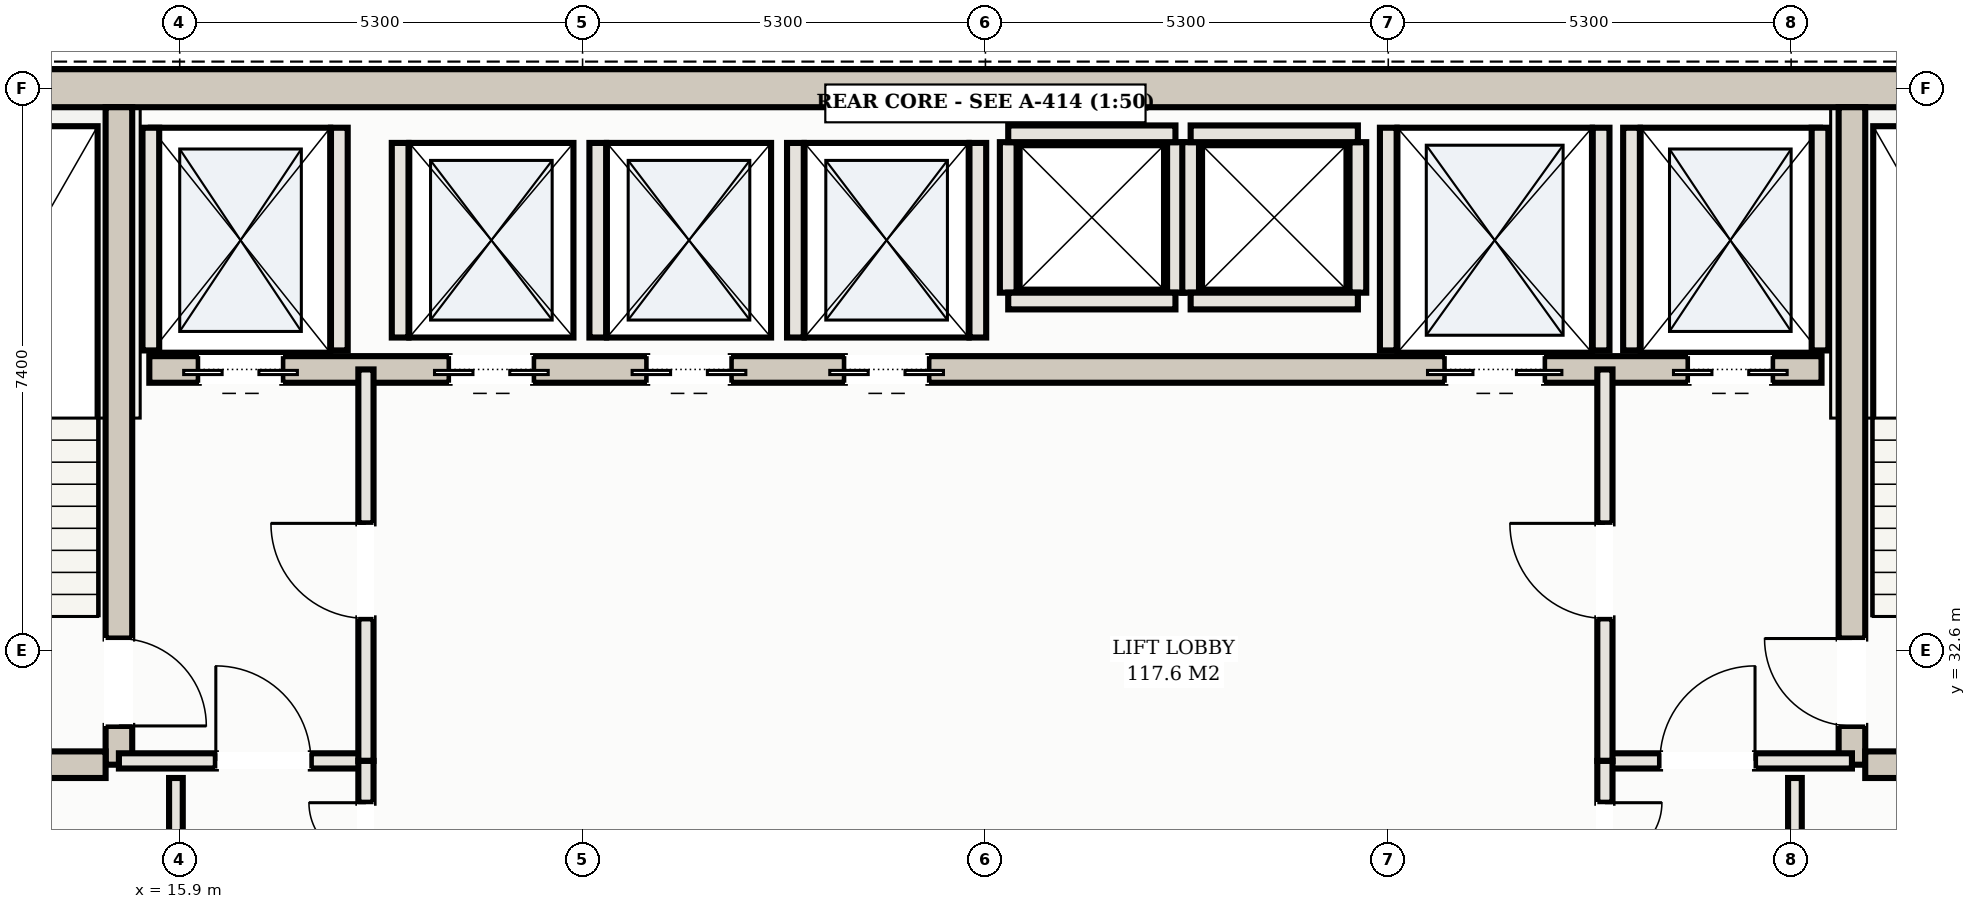
"""IFC4 building model, lengths in metres.
Left out: names, types, materials, properties, quantities, classifications, styles, units other than length and angle.
Written with IfcOpenShell. Run it as: python <this file> out.ifc"""

import sys

from ifc_helpers import new_model, si_unit, direction, frame, frame_2d, origin, place, context, subcontext, project, spatial, rectangle, extrude, element, fill, save


model = new_model("IFC4")
c1 = context("Model", 3, precision=1e-05, world=origin(), true_north=direction((0.0, 1.0)))
c2 = subcontext(c1, "Body", "Model", "MODEL_VIEW")
j1 = project(units=[si_unit("LENGTHUNIT", "METRE"), si_unit("PLANEANGLEUNIT", "RADIAN")], contexts=[c1])
p1 = place(None, origin())
s1 = spatial("IfcSite", under=j1, at=p1, CompositionType="ELEMENT")
p2 = place(p1, origin())
s2 = spatial("IfcBuilding", under=s1, at=p2, CompositionType="ELEMENT")
p3 = place(p2, frame((0.0, 0.0, 246.2)))
s3 = spatial("IfcBuildingStorey", under=s2, at=p3, CompositionType="ELEMENT", Elevation=246.2)
p4 = place(p3, frame((10.35, 40.0, 0.0), z_axis=(0.0, 0.0, 1.0), x_axis=(1.0, 0.0, 0.0)))
e1 = element("IfcWall", 1, at=p4, inside=s3, PredefinedType="SHEAR", context=c2, shape_type="SweptSolid", body=[
    extrude(rectangle(XDim=32.3, YDim=0.5, at=frame_2d((16.15, 0.0))), origin(), (0.0, 0.0, 1.0), 3.11),
])
p5 = place(p3, frame((15.1, 31.1, 0.0), z_axis=(0.0, 0.0, 1.0), x_axis=(0.0, 1.0, 0.0)))
e2 = element("IfcWall", 2, at=p5, inside=s3, PredefinedType="SHEAR", context=c2, shape_type="SweptSolid", body=[
    extrude(rectangle(XDim=8.65, YDim=0.35, at=frame_2d((4.325, 0.0))), origin(), (0.0, 0.0, 1.0), 3.11),
])
p6 = place(p5, frame((0.51, 0.0, 0.0)))
e3 = element("IfcOpeningElement", 3, at=p6, cuts=e2, PredefinedType="OPENING", context=c2, shape_type="SweptSolid", body=[
    extrude(rectangle(XDim=1.15, YDim=2.2, at=frame_2d((0.575, 1.1))), frame((0.0, 0.185, 0.0), z_axis=(0.0, -1.0, 0.0), x_axis=(1.0, 0.0, 0.0)), (0.0, 0.0, 1.0), 0.37),
])
p7 = place(p3, frame((10.85, 31.1, 0.0), z_axis=(0.0, 0.0, 1.0), x_axis=(1.0, 0.0, 0.0)))
e4 = element("IfcWall", 4, at=p7, inside=s3, PredefinedType="SHEAR", context=c2, shape_type="SweptSolid", body=[
    extrude(rectangle(XDim=4.075, YDim=0.35, at=frame_2d((2.038, 0.0))), origin(), (0.0, 0.0, 1.0), 3.11),
])
p8 = place(p3, frame((37.9, 31.1, 0.0), z_axis=(0.0, 0.0, 1.0), x_axis=(0.0, 1.0, 0.0)))
e5 = element("IfcWall", 5, at=p8, inside=s3, PredefinedType="SHEAR", context=c2, shape_type="SweptSolid", body=[
    extrude(rectangle(XDim=8.65, YDim=0.35, at=frame_2d((4.325, 0.0))), origin(), (0.0, 0.0, 1.0), 3.11),
])
p9 = place(p8, frame((0.51, 0.0, 0.0)))
e6 = element("IfcOpeningElement", 6, at=p9, cuts=e5, PredefinedType="OPENING", context=c2, shape_type="SweptSolid", body=[
    extrude(rectangle(XDim=1.15, YDim=2.2, at=frame_2d((0.575, 1.1))), frame((0.0, 0.185, 0.0), z_axis=(0.0, -1.0, 0.0), x_axis=(1.0, 0.0, 0.0)), (0.0, 0.0, 1.0), 0.37),
])
p10 = place(p3, frame((38.075, 31.1, 0.0), z_axis=(0.0, 0.0, 1.0), x_axis=(1.0, 0.0, 0.0)))
e7 = element("IfcWall", 7, at=p10, inside=s3, PredefinedType="SHEAR", context=c2, shape_type="SweptSolid", body=[
    extrude(rectangle(XDim=4.075, YDim=0.35, at=frame_2d((2.038, 0.0))), origin(), (0.0, 0.0, 1.0), 3.11),
])
p11 = place(p3, frame((15.5, 36.3, 0.0), z_axis=(0.0, 0.0, 1.0), x_axis=(1.0, 0.0, 0.0)))
e8 = element("IfcWall", 8, at=p11, inside=s3, PredefinedType="SHEAR", context=c2, shape_type="SweptSolid", body=[
    extrude(rectangle(XDim=22.0, YDim=0.35, at=frame_2d((11.0, 0.0))), origin(), (0.0, 0.0, 1.0), 3.11),
])
p12 = place(p11, frame((0.65, 0.0, 0.0)))
e9 = element("IfcOpeningElement", 9, at=p12, cuts=e8, PredefinedType="OPENING", context=c2, shape_type="SweptSolid", body=[
    extrude(rectangle(XDim=1.1, YDim=2.15, at=frame_2d((0.55, 1.075))), frame((0.0, 0.185, 0.0), z_axis=(0.0, -1.0, 0.0), x_axis=(1.0, 0.0, 0.0)), (0.0, 0.0, 1.0), 0.37),
])
p13 = place(p11, frame((20.25, 0.0, 0.0)))
e10 = element("IfcOpeningElement", 10, at=p13, cuts=e8, PredefinedType="OPENING", context=c2, shape_type="SweptSolid", body=[
    extrude(rectangle(XDim=1.1, YDim=2.15, at=frame_2d((0.55, 1.075))), frame((0.0, 0.185, 0.0), z_axis=(0.0, -1.0, 0.0), x_axis=(1.0, 0.0, 0.0)), (0.0, 0.0, 1.0), 0.37),
])
p14 = place(p11, frame((17.05, 0.0, 0.0)))
e11 = element("IfcOpeningElement", 11, at=p14, cuts=e8, PredefinedType="OPENING", context=c2, shape_type="SweptSolid", body=[
    extrude(rectangle(XDim=1.3, YDim=2.2, at=frame_2d((0.65, 1.1))), frame((0.0, 0.185, 0.0), z_axis=(0.0, -1.0, 0.0), x_axis=(1.0, 0.0, 0.0)), (0.0, 0.0, 1.0), 0.37),
])
p15 = place(p11, frame((3.95, 0.0, 0.0)))
e12 = element("IfcOpeningElement", 12, at=p15, cuts=e8, PredefinedType="OPENING", context=c2, shape_type="SweptSolid", body=[
    extrude(rectangle(XDim=1.1, YDim=2.15, at=frame_2d((0.55, 1.075))), frame((0.0, 0.185, 0.0), z_axis=(0.0, -1.0, 0.0), x_axis=(1.0, 0.0, 0.0)), (0.0, 0.0, 1.0), 0.37),
])
p16 = place(p11, frame((6.55, 0.0, 0.0)))
e13 = element("IfcOpeningElement", 13, at=p16, cuts=e8, PredefinedType="OPENING", context=c2, shape_type="SweptSolid", body=[
    extrude(rectangle(XDim=1.1, YDim=2.15, at=frame_2d((0.55, 1.075))), frame((0.0, 0.185, 0.0), z_axis=(0.0, -1.0, 0.0), x_axis=(1.0, 0.0, 0.0)), (0.0, 0.0, 1.0), 0.37),
])
p17 = place(p11, frame((9.15, 0.0, 0.0)))
e14 = element("IfcOpeningElement", 14, at=p17, cuts=e8, PredefinedType="OPENING", context=c2, shape_type="SweptSolid", body=[
    extrude(rectangle(XDim=1.1, YDim=2.15, at=frame_2d((0.55, 1.075))), frame((0.0, 0.185, 0.0), z_axis=(0.0, -1.0, 0.0), x_axis=(1.0, 0.0, 0.0)), (0.0, 0.0, 1.0), 0.37),
])
for number, where, z_axis, x_axis in (
    (15, (15.52, 36.55, 0.0), (0.0, 0.0, 1.0), (0.0, 1.0, 0.0)),
    (16, (18.0, 36.55, 0.0), (0.0, 0.0, 1.0), (0.0, 1.0, 0.0)),
    (17, (35.0, 36.55, 0.0), (0.0, 0.0, 1.0), (0.0, 1.0, 0.0)),
    (18, (37.48, 36.55, 0.0), (0.0, 0.0, 1.0), (0.0, 1.0, 0.0)),
    (19, (31.8, 36.55, 0.0), (0.0, 0.0, 1.0), (0.0, 1.0, 0.0)),
    (20, (34.6, 36.55, 0.0), (0.0, 0.0, 1.0), (0.0, 1.0, 0.0)),
):
    element("IfcWall", number, at=place(p3, frame(where, z_axis=z_axis, x_axis=x_axis)), inside=s3, PredefinedType="SOLIDWALL", context=c2, shape_type="SweptSolid", body=[
        extrude(rectangle(XDim=2.93, YDim=0.22, at=frame_2d((1.465, 0.0))), origin(), (0.0, 0.0, 1.0), 3.11),
    ])
for number, where, z_axis, x_axis in (
    (21, (18.8, 36.72, 0.0), (0.0, 0.0, 1.0), (0.0, 1.0, 0.0)),
    (22, (21.4, 36.72, 0.0), (0.0, 0.0, 1.0), (0.0, 1.0, 0.0)),
    (23, (24.0, 36.72, 0.0), (0.0, 0.0, 1.0), (0.0, 1.0, 0.0)),
    (24, (26.4, 36.72, 0.0), (0.0, 0.0, 1.0), (0.0, 1.0, 0.0)),
):
    element("IfcWall", number, at=place(p3, frame(where, z_axis=z_axis, x_axis=x_axis)), inside=s3, PredefinedType="SOLIDWALL", context=c2, shape_type="SweptSolid", body=[
        extrude(rectangle(XDim=2.56, YDim=0.22, at=frame_2d((1.28, 0.0))), origin(), (0.0, 0.0, 1.0), 3.11),
    ])
for number, where, z_axis, x_axis in (
    (25, (26.8, 37.31, 0.0), (0.0, 0.0, 1.0), (0.0, 1.0, 0.0)),
    (26, (29.0, 37.31, 0.0), (0.0, 0.0, 1.0), (0.0, 1.0, 0.0)),
):
    element("IfcWall", number, at=place(p3, frame(where, z_axis=z_axis, x_axis=x_axis)), inside=s3, PredefinedType="SOLIDWALL", context=c2, shape_type="SweptSolid", body=[
        extrude(rectangle(XDim=1.98, YDim=0.22, at=frame_2d((0.99, 0.0))), origin(), (0.0, 0.0, 1.0), 3.11),
    ])
for number, where, z_axis, x_axis in (
    (27, (26.8, 39.4, 0.0), (0.0, 0.0, 1.0), (1.0, 0.0, 0.0)),
    (28, (26.8, 37.2, 0.0), (0.0, 0.0, 1.0), (1.0, 0.0, 0.0)),
):
    element("IfcWall", number, at=place(p3, frame(where, z_axis=z_axis, x_axis=x_axis)), inside=s3, PredefinedType="SOLIDWALL", context=c2, shape_type="SweptSolid", body=[
        extrude(rectangle(XDim=2.2, YDim=0.22, at=frame_2d((1.1, 0.0))), origin(), (0.0, 0.0, 1.0), 3.11),
    ])
for number, where, z_axis, x_axis in (
    (29, (29.2, 37.31, 0.0), (0.0, 0.0, 1.0), (0.0, 1.0, 0.0)),
    (30, (31.4, 37.31, 0.0), (0.0, 0.0, 1.0), (0.0, 1.0, 0.0)),
):
    element("IfcWall", number, at=place(p3, frame(where, z_axis=z_axis, x_axis=x_axis)), inside=s3, PredefinedType="SOLIDWALL", context=c2, shape_type="SweptSolid", body=[
        extrude(rectangle(XDim=1.98, YDim=0.22, at=frame_2d((0.99, 0.0))), origin(), (0.0, 0.0, 1.0), 3.11),
    ])
for number, where, z_axis, x_axis in (
    (31, (29.2, 39.4, 0.0), (0.0, 0.0, 1.0), (1.0, 0.0, 0.0)),
    (32, (29.2, 37.2, 0.0), (0.0, 0.0, 1.0), (1.0, 0.0, 0.0)),
):
    element("IfcWall", number, at=place(p3, frame(where, z_axis=z_axis, x_axis=x_axis)), inside=s3, PredefinedType="SOLIDWALL", context=c2, shape_type="SweptSolid", body=[
        extrude(rectangle(XDim=2.2, YDim=0.22, at=frame_2d((1.1, 0.0))), origin(), (0.0, 0.0, 1.0), 3.11),
    ])
p18 = place(p3, frame((15.1, 31.15, 0.0), z_axis=(0.0, 0.0, 1.0), x_axis=(1.0, 0.0, 0.0)))
e33 = element("IfcWall", 33, at=p18, inside=s3, PredefinedType="PARTITIONING", context=c2, shape_type="SweptSolid", body=[
    extrude(rectangle(XDim=3.25, YDim=0.2, at=frame_2d((1.625, 0.0))), origin(), (0.0, 0.0, 1.0), 2.45),
])
p19 = place(p18, frame((1.275, 0.0, 0.0)))
e34 = element("IfcOpeningElement", 34, at=p19, cuts=e33, PredefinedType="OPENING", context=c2, shape_type="SweptSolid", body=[
    extrude(rectangle(XDim=1.25, YDim=2.2, at=frame_2d((0.625, 1.1))), frame((0.0, 0.11, 0.0), z_axis=(0.0, -1.0, 0.0), x_axis=(1.0, 0.0, 0.0)), (0.0, 0.0, 1.0), 0.22),
])
p20 = place(p3, frame((18.35, 31.15, 0.0), z_axis=(0.0, 0.0, 1.0), x_axis=(0.0, 1.0, 0.0)))
e35 = element("IfcWall", 35, at=p20, inside=s3, PredefinedType="PARTITIONING", context=c2, shape_type="SweptSolid", body=[
    extrude(rectangle(XDim=5.15, YDim=0.2, at=frame_2d((2.575, 0.0))), origin(), (0.0, 0.0, 1.0), 2.45),
])
p21 = place(p20, frame((1.875, 0.0, 0.0)))
e36 = element("IfcOpeningElement", 36, at=p21, cuts=e35, PredefinedType="OPENING", context=c2, shape_type="SweptSolid", body=[
    extrude(rectangle(XDim=1.25, YDim=2.2, at=frame_2d((0.625, 1.1))), frame((0.0, 0.11, 0.0), z_axis=(0.0, -1.0, 0.0), x_axis=(1.0, 0.0, 0.0)), (0.0, 0.0, 1.0), 0.22),
])
p22 = place(p3, frame((34.65, 31.15, 0.0), z_axis=(0.0, 0.0, 1.0), x_axis=(1.0, 0.0, 0.0)))
e37 = element("IfcWall", 37, at=p22, inside=s3, PredefinedType="PARTITIONING", context=c2, shape_type="SweptSolid", body=[
    extrude(rectangle(XDim=3.25, YDim=0.2, at=frame_2d((1.625, 0.0))), origin(), (0.0, 0.0, 1.0), 2.45),
])
p23 = place(p22, frame((0.725, 0.0, 0.0)))
e38 = element("IfcOpeningElement", 38, at=p23, cuts=e37, PredefinedType="OPENING", context=c2, shape_type="SweptSolid", body=[
    extrude(rectangle(XDim=1.25, YDim=2.2, at=frame_2d((0.625, 1.1))), frame((0.0, 0.11, 0.0), z_axis=(0.0, -1.0, 0.0), x_axis=(1.0, 0.0, 0.0)), (0.0, 0.0, 1.0), 0.22),
])
p24 = place(p3, frame((34.65, 31.15, 0.0), z_axis=(0.0, 0.0, 1.0), x_axis=(0.0, 1.0, 0.0)))
e39 = element("IfcWall", 39, at=p24, inside=s3, PredefinedType="PARTITIONING", context=c2, shape_type="SweptSolid", body=[
    extrude(rectangle(XDim=5.15, YDim=0.2, at=frame_2d((2.575, 0.0))), origin(), (0.0, 0.0, 1.0), 2.45),
])
p25 = place(p24, frame((1.875, 0.0, 0.0)))
e40 = element("IfcOpeningElement", 40, at=p25, cuts=e39, PredefinedType="OPENING", context=c2, shape_type="SweptSolid", body=[
    extrude(rectangle(XDim=1.25, YDim=2.2, at=frame_2d((0.625, 1.1))), frame((0.0, 0.11, 0.0), z_axis=(0.0, -1.0, 0.0), x_axis=(1.0, 0.0, 0.0)), (0.0, 0.0, 1.0), 0.22),
])
p26 = place(p3, frame((15.85, 25.45, 0.0), z_axis=(0.0, 0.0, 1.0), x_axis=(0.0, 1.0, 0.0)))
e41 = element("IfcWall", 41, at=p26, inside=s3, PredefinedType="PARTITIONING", context=c2, shape_type="SweptSolid", body=[
    extrude(rectangle(XDim=5.475, YDim=0.18, at=frame_2d((2.738, 0.0))), origin(), (0.0, 0.0, 1.0), 2.45),
])
p27 = place(p26, frame((0.6, 0.0, 0.0)))
e42 = element("IfcOpeningElement", 42, at=p27, cuts=e41, PredefinedType="OPENING", context=c2, shape_type="SweptSolid", body=[
    extrude(rectangle(XDim=0.9, YDim=2.15, at=frame_2d((0.45, 1.075))), frame((0.0, 0.1, 0.0), z_axis=(0.0, -1.0, 0.0), x_axis=(1.0, 0.0, 0.0)), (0.0, 0.0, 1.0), 0.2),
])
p28 = place(p26, frame((3.302, 0.0, 0.0)))
e43 = element("IfcOpeningElement", 43, at=p28, cuts=e41, PredefinedType="OPENING", context=c2, shape_type="SweptSolid", body=[
    extrude(rectangle(XDim=0.92, YDim=2.15, at=frame_2d((0.46, 1.075))), frame((0.0, 0.1, 0.0), z_axis=(0.0, -1.0, 0.0), x_axis=(1.0, 0.0, 0.0)), (0.0, 0.0, 1.0), 0.2),
])
p29 = place(p3, frame((37.15, 25.45, 0.0), z_axis=(0.0, 0.0, 1.0), x_axis=(0.0, 1.0, 0.0)))
e44 = element("IfcWall", 44, at=p29, inside=s3, PredefinedType="PARTITIONING", context=c2, shape_type="SweptSolid", body=[
    extrude(rectangle(XDim=5.475, YDim=0.18, at=frame_2d((2.738, 0.0))), origin(), (0.0, 0.0, 1.0), 2.45),
])
p30 = place(p29, frame((2.277, 0.0, 0.0)))
e45 = element("IfcOpeningElement", 45, at=p30, cuts=e44, PredefinedType="OPENING", context=c2, shape_type="SweptSolid", body=[
    extrude(rectangle(XDim=0.92, YDim=2.15, at=frame_2d((0.46, 1.075))), frame((0.0, 0.1, 0.0), z_axis=(0.0, -1.0, 0.0), x_axis=(1.0, 0.0, 0.0)), (0.0, 0.0, 1.0), 0.2),
])
p31 = place(p3, frame((18.35, 28.55, 0.0), z_axis=(0.0, 0.0, 1.0), x_axis=(0.0, 1.0, 0.0)))
e46 = element("IfcWall", 46, at=p31, inside=s3, PredefinedType="PARTITIONING", context=c2, shape_type="SweptSolid", body=[
    extrude(rectangle(XDim=2.6, YDim=0.2, at=frame_2d((1.3, 0.0))), origin(), (0.0, 0.0, 1.0), 2.45),
])
p32 = place(p31, frame((0.55, 0.0, 0.0)))
e47 = element("IfcOpeningElement", 47, at=p32, cuts=e46, PredefinedType="OPENING", context=c2, shape_type="SweptSolid", body=[
    extrude(rectangle(XDim=1.5, YDim=2.25, at=frame_2d((0.75, 1.125))), frame((0.0, 0.11, 0.0), z_axis=(0.0, -1.0, 0.0), x_axis=(1.0, 0.0, 0.0)), (0.0, 0.0, 1.0), 0.22),
])
p33 = place(p3, frame((34.65, 28.55, 0.0), z_axis=(0.0, 0.0, 1.0), x_axis=(0.0, 1.0, 0.0)))
e48 = element("IfcWall", 48, at=p33, inside=s3, PredefinedType="PARTITIONING", context=c2, shape_type="SweptSolid", body=[
    extrude(rectangle(XDim=2.6, YDim=0.2, at=frame_2d((1.3, 0.0))), origin(), (0.0, 0.0, 1.0), 2.45),
])
p34 = place(p33, frame((0.55, 0.0, 0.0)))
e49 = element("IfcOpeningElement", 49, at=p34, cuts=e48, PredefinedType="OPENING", context=c2, shape_type="SweptSolid", body=[
    extrude(rectangle(XDim=1.5, YDim=2.25, at=frame_2d((0.75, 1.125))), frame((0.0, 0.11, 0.0), z_axis=(0.0, -1.0, 0.0), x_axis=(1.0, 0.0, 0.0)), (0.0, 0.0, 1.0), 0.22),
])
p35 = place(p12, frame((1.1, 0.0, 0.0), z_axis=(0.0, 0.0, 1.0), x_axis=(-1.0, 0.0, 0.0)))
e50 = element("IfcDoor", 50, at=p35, inside=s3, OperationType="DOUBLE_DOOR_SLIDING", PredefinedType="DOOR", context=c2, shape_type="SweptSolid", body=[
    extrude(rectangle(XDim=1.1, YDim=2.15, at=frame_2d((0.55, 1.075))), frame((0.0, 0.025, 0.0), z_axis=(0.0, -1.0, 0.0), x_axis=(1.0, 0.0, 0.0)), (0.0, 0.0, 1.0), 0.05),
])
fill(e9, e50)
p36 = place(p13, frame((1.1, 0.0, 0.0), z_axis=(0.0, 0.0, 1.0), x_axis=(-1.0, 0.0, 0.0)))
e51 = element("IfcDoor", 51, at=p36, inside=s3, OperationType="DOUBLE_DOOR_SLIDING", PredefinedType="DOOR", context=c2, shape_type="SweptSolid", body=[
    extrude(rectangle(XDim=1.1, YDim=2.15, at=frame_2d((0.55, 1.075))), frame((0.0, 0.025, 0.0), z_axis=(0.0, -1.0, 0.0), x_axis=(1.0, 0.0, 0.0)), (0.0, 0.0, 1.0), 0.05),
])
fill(e10, e51)
p37 = place(p14, frame((1.3, 0.0, 0.0), z_axis=(0.0, 0.0, 1.0), x_axis=(-1.0, 0.0, 0.0)))
e52 = element("IfcDoor", 52, at=p37, inside=s3, OperationType="DOUBLE_DOOR_SLIDING", PredefinedType="DOOR", context=c2, shape_type="SweptSolid", body=[
    extrude(rectangle(XDim=1.3, YDim=2.2, at=frame_2d((0.65, 1.1))), frame((0.0, 0.025, 0.0), z_axis=(0.0, -1.0, 0.0), x_axis=(1.0, 0.0, 0.0)), (0.0, 0.0, 1.0), 0.05),
])
fill(e11, e52)
p38 = place(p15, frame((1.1, 0.0, 0.0), z_axis=(0.0, 0.0, 1.0), x_axis=(-1.0, 0.0, 0.0)))
e53 = element("IfcDoor", 53, at=p38, inside=s3, OperationType="DOUBLE_DOOR_SLIDING", PredefinedType="DOOR", context=c2, shape_type="SweptSolid", body=[
    extrude(rectangle(XDim=1.1, YDim=2.15, at=frame_2d((0.55, 1.075))), frame((0.0, 0.025, 0.0), z_axis=(0.0, -1.0, 0.0), x_axis=(1.0, 0.0, 0.0)), (0.0, 0.0, 1.0), 0.05),
])
fill(e12, e53)
p39 = place(p16, frame((1.1, 0.0, 0.0), z_axis=(0.0, 0.0, 1.0), x_axis=(-1.0, 0.0, 0.0)))
e54 = element("IfcDoor", 54, at=p39, inside=s3, OperationType="DOUBLE_DOOR_SLIDING", PredefinedType="DOOR", context=c2, shape_type="SweptSolid", body=[
    extrude(rectangle(XDim=1.1, YDim=2.15, at=frame_2d((0.55, 1.075))), frame((0.0, 0.025, 0.0), z_axis=(0.0, -1.0, 0.0), x_axis=(1.0, 0.0, 0.0)), (0.0, 0.0, 1.0), 0.05),
])
fill(e13, e54)
p40 = place(p17, frame((1.1, 0.0, 0.0), z_axis=(0.0, 0.0, 1.0), x_axis=(-1.0, 0.0, 0.0)))
e55 = element("IfcDoor", 55, at=p40, inside=s3, OperationType="DOUBLE_DOOR_SLIDING", PredefinedType="DOOR", context=c2, shape_type="SweptSolid", body=[
    extrude(rectangle(XDim=1.1, YDim=2.15, at=frame_2d((0.55, 1.075))), frame((0.0, 0.025, 0.0), z_axis=(0.0, -1.0, 0.0), x_axis=(1.0, 0.0, 0.0)), (0.0, 0.0, 1.0), 0.05),
])
fill(e14, e55)
p41 = place(p19, origin())
e56 = element("IfcDoor", 56, at=p41, inside=s3, OperationType="SINGLE_SWING_LEFT", PredefinedType="DOOR", context=c2, shape_type="SweptSolid", body=[
    extrude(rectangle(XDim=1.25, YDim=2.2, at=frame_2d((0.625, 1.1))), frame((0.0, 0.025, 0.0), z_axis=(0.0, -1.0, 0.0), x_axis=(1.0, 0.0, 0.0)), (0.0, 0.0, 1.0), 0.05),
])
fill(e34, e56)
p42 = place(p21, origin())
e57 = element("IfcDoor", 57, at=p42, inside=s3, OperationType="SINGLE_SWING_RIGHT", PredefinedType="DOOR", context=c2, shape_type="SweptSolid", body=[
    extrude(rectangle(XDim=1.25, YDim=2.2, at=frame_2d((0.625, 1.1))), frame((0.0, 0.025, 0.0), z_axis=(0.0, -1.0, 0.0), x_axis=(1.0, 0.0, 0.0)), (0.0, 0.0, 1.0), 0.05),
])
fill(e36, e57)
p43 = place(p23, origin())
e58 = element("IfcDoor", 58, at=p43, inside=s3, OperationType="SINGLE_SWING_RIGHT", PredefinedType="DOOR", context=c2, shape_type="SweptSolid", body=[
    extrude(rectangle(XDim=1.25, YDim=2.2, at=frame_2d((0.625, 1.1))), frame((0.0, 0.025, 0.0), z_axis=(0.0, -1.0, 0.0), x_axis=(1.0, 0.0, 0.0)), (0.0, 0.0, 1.0), 0.05),
])
fill(e38, e58)
p44 = place(p25, origin())
e59 = element("IfcDoor", 59, at=p44, inside=s3, OperationType="SINGLE_SWING_RIGHT", PredefinedType="DOOR", context=c2, shape_type="SweptSolid", body=[
    extrude(rectangle(XDim=1.25, YDim=2.2, at=frame_2d((0.625, 1.1))), frame((0.0, 0.025, 0.0), z_axis=(0.0, -1.0, 0.0), x_axis=(1.0, 0.0, 0.0)), (0.0, 0.0, 1.0), 0.05),
])
fill(e40, e59)
p45 = place(p6, frame((1.15, 0.0, 0.0), z_axis=(0.0, 0.0, 1.0), x_axis=(-1.0, 0.0, 0.0)))
e60 = element("IfcDoor", 60, at=p45, inside=s3, OperationType="SINGLE_SWING_RIGHT", PredefinedType="DOOR", context=c2, shape_type="SweptSolid", body=[
    extrude(rectangle(XDim=1.15, YDim=2.2, at=frame_2d((0.575, 1.1))), frame((0.0, 0.025, 0.0), z_axis=(0.0, -1.0, 0.0), x_axis=(1.0, 0.0, 0.0)), (0.0, 0.0, 1.0), 0.05),
])
fill(e3, e60)
p46 = place(p9, origin())
e61 = element("IfcDoor", 61, at=p46, inside=s3, OperationType="SINGLE_SWING_RIGHT", PredefinedType="DOOR", context=c2, shape_type="SweptSolid", body=[
    extrude(rectangle(XDim=1.15, YDim=2.2, at=frame_2d((0.575, 1.1))), frame((0.0, 0.025, 0.0), z_axis=(0.0, -1.0, 0.0), x_axis=(1.0, 0.0, 0.0)), (0.0, 0.0, 1.0), 0.05),
])
fill(e6, e61)
p47 = place(p32, origin())
e62 = element("IfcDoor", 62, at=p47, inside=s3, OperationType="DOUBLE_DOOR_SINGLE_SWING", PredefinedType="DOOR", context=c2, shape_type="SweptSolid", body=[
    extrude(rectangle(XDim=1.5, YDim=2.25, at=frame_2d((0.75, 1.125))), frame((0.0, 0.025, 0.0), z_axis=(0.0, -1.0, 0.0), x_axis=(1.0, 0.0, 0.0)), (0.0, 0.0, 1.0), 0.05),
])
fill(e47, e62)
p48 = place(p34, frame((1.5, 0.0, 0.0), z_axis=(0.0, 0.0, 1.0), x_axis=(-1.0, 0.0, 0.0)))
e63 = element("IfcDoor", 63, at=p48, inside=s3, OperationType="DOUBLE_DOOR_SINGLE_SWING", PredefinedType="DOOR", context=c2, shape_type="SweptSolid", body=[
    extrude(rectangle(XDim=1.5, YDim=2.25, at=frame_2d((0.75, 1.125))), frame((0.0, 0.025, 0.0), z_axis=(0.0, -1.0, 0.0), x_axis=(1.0, 0.0, 0.0)), (0.0, 0.0, 1.0), 0.05),
])
fill(e49, e63)
save(model, sys.argv[1])
